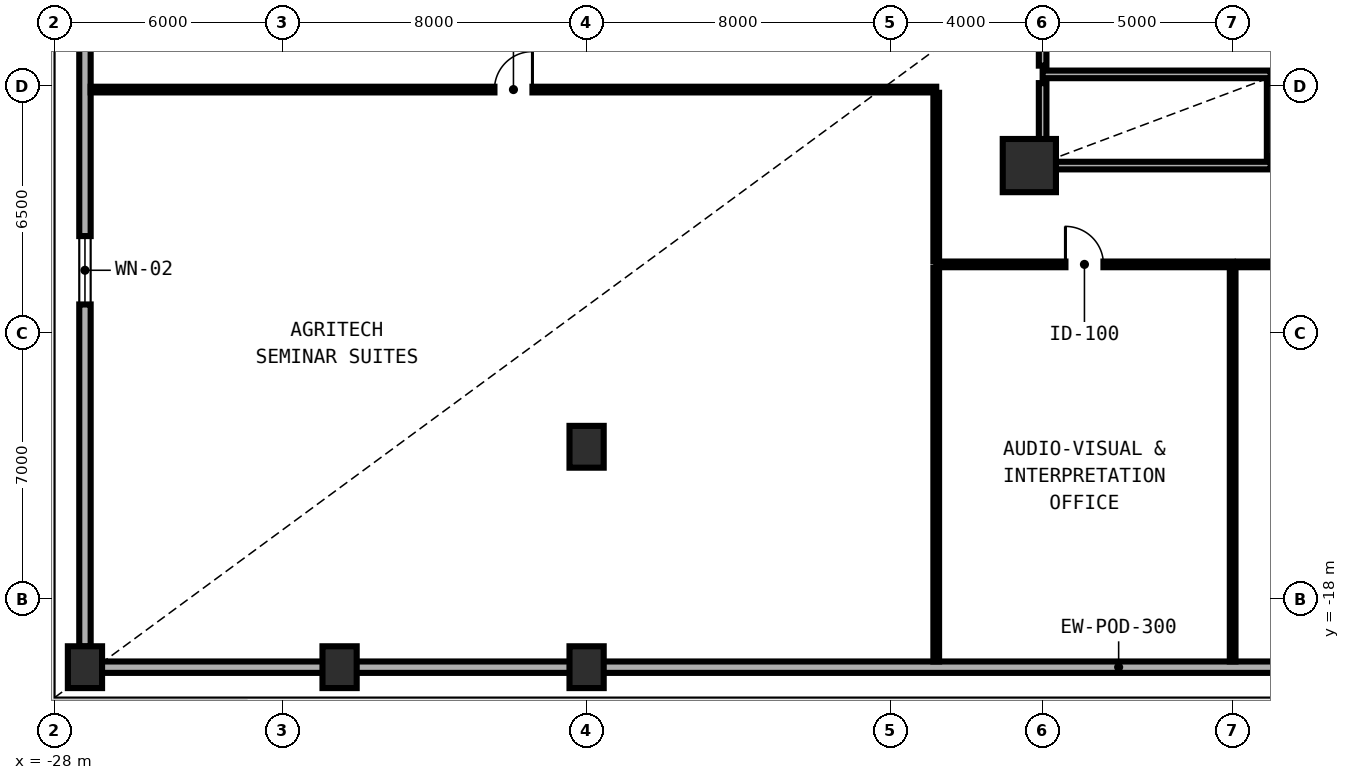
"""IFC4 building model, lengths in metres.
Left out: names, types, materials, properties, quantities, classifications, styles, units other than length and angle.
Written with IfcOpenShell. Run it as: python <this file> out.ifc"""

import sys

from ifc_helpers import new_model, si_unit, direction, frame, frame_2d, origin, origin_2d, place, context, subcontext, project, spatial, rectangle, extrude, element, fill, save


model = new_model("IFC4")
c1 = context("Model", 3, precision=1e-05, world=origin(), true_north=direction((0.0, 1.0)))
c2 = subcontext(c1, "Body", "Model", "MODEL_VIEW")
j1 = project(units=[si_unit("LENGTHUNIT", "METRE"), si_unit("PLANEANGLEUNIT", "RADIAN")], contexts=[c1])
p1 = place(None, origin())
s1 = spatial("IfcSite", under=j1, at=p1, CompositionType="ELEMENT")
p2 = place(p1, origin())
s2 = spatial("IfcBuilding", under=s1, at=p2, CompositionType="ELEMENT")
p3 = place(p2, frame((0.0, 0.0, 18.4)))
s3 = spatial("IfcBuildingStorey", under=s2, at=p3, CompositionType="ELEMENT", Elevation=18.4)
p4 = place(p3, frame((-2.35, -6.6, 0.0), z_axis=(0.0, 0.0, 1.0), x_axis=(1.0, 0.0, 0.0)))
e1 = element("IfcColumn", 1, at=p4, inside=s3, PredefinedType="COLUMN", context=c2, shape_type="SweptSolid", body=[
    extrude(rectangle(XDim=1.4, YDim=1.4, at=origin_2d()), origin(), (0.0, 0.0, 1.0), 4.575),
])
for number, where, z_axis, x_axis in (
    (2, (-27.2, -19.8, 0.0), (0.0, 0.0, 1.0), (1.0, 0.0, 0.0)),
    (3, (-20.5, -19.8, 0.0), (0.0, 0.0, 1.0), (1.0, 0.0, 0.0)),
    (4, (-14.0, -19.8, 0.0), (0.0, 0.0, 1.0), (1.0, 0.0, 0.0)),
    (5, (-14.0, -14.0, 0.0), (0.0, 0.0, 1.0), (1.0, 0.0, 0.0)),
):
    element("IfcColumn", number, at=place(p3, frame(where, z_axis=z_axis, x_axis=x_axis)), inside=s3, PredefinedType="COLUMN", context=c2, shape_type="SweptSolid", body=[
        extrude(rectangle(XDim=0.9, YDim=1.1, at=origin_2d()), origin(), (0.0, 0.0, 1.0), 4.575),
    ])
p5 = place(p3, frame((-27.2, -19.255, 0.0), z_axis=(0.0, 0.0, 1.0), x_axis=(0.0, 1.0, 0.0)))
e6 = element("IfcWall", 6, at=p5, inside=s3, PredefinedType="SOLIDWALL", context=c2, shape_type="SweptSolid", body=[
    extrude(rectangle(XDim=38.51, YDim=0.3, at=frame_2d((19.255, 0.0))), origin(), (0.0, 0.0, 1.0), 3.35),
])
p6 = place(p5, frame((9.0, 0.0, 0.85)))
e7 = element("IfcOpeningElement", 7, at=p6, cuts=e6, PredefinedType="OPENING", context=c2, shape_type="SweptSolid", body=[
    extrude(rectangle(XDim=1.8, YDim=1.9, at=frame_2d((0.9, 0.95))), frame((0.0, 0.16, 0.0), z_axis=(0.0, -1.0, 0.0), x_axis=(1.0, 0.0, 0.0)), (0.0, 0.0, 1.0), 0.32),
])
p7 = place(p5, frame((16.0, 0.0, 0.85)))
e8 = element("IfcOpeningElement", 8, at=p7, cuts=e6, PredefinedType="OPENING", context=c2, shape_type="SweptSolid", body=[
    extrude(rectangle(XDim=1.8, YDim=1.9, at=frame_2d((0.9, 0.95))), frame((0.0, 0.16, 0.0), z_axis=(0.0, -1.0, 0.0), x_axis=(1.0, 0.0, 0.0)), (0.0, 0.0, 1.0), 0.32),
])
p8 = place(p5, frame((29.0, 0.0, 0.85)))
e9 = element("IfcOpeningElement", 9, at=p8, cuts=e6, PredefinedType="OPENING", context=c2, shape_type="SweptSolid", body=[
    extrude(rectangle(XDim=1.8, YDim=1.9, at=frame_2d((0.9, 0.95))), frame((0.0, 0.16, 0.0), z_axis=(0.0, -1.0, 0.0), x_axis=(1.0, 0.0, 0.0)), (0.0, 0.0, 1.0), 0.32),
])
p9 = place(p3, frame((26.755, -19.8, 0.0), z_axis=(0.0, 0.0, 1.0), x_axis=(-1.0, 0.0, 0.0)))
e10 = element("IfcWall", 10, at=p9, inside=s3, PredefinedType="SOLIDWALL", context=c2, shape_type="SweptSolid", body=[
    extrude(rectangle(XDim=53.51, YDim=0.3, at=frame_2d((26.755, 0.0))), origin(), (0.0, 0.0, 1.0), 3.35),
])
p10 = place(p3, frame((-2.0, -4.2, 0.0), z_axis=(0.0, 0.0, 1.0), x_axis=(1.0, 0.0, 0.0)))
e11 = element("IfcWall", 11, at=p10, inside=s3, PredefinedType="SOLIDWALL", context=c2, shape_type="SweptSolid", body=[
    extrude(rectangle(XDim=6.0, YDim=0.2, at=frame_2d((3.0, 0.0))), origin(), (0.0, 0.0, 1.0), 4.28),
])
p11 = place(p3, frame((-2.0, -6.6, 0.0), z_axis=(0.0, 0.0, 1.0), x_axis=(1.0, 0.0, 0.0)))
e12 = element("IfcWall", 12, at=p11, inside=s3, PredefinedType="SOLIDWALL", context=c2, shape_type="SweptSolid", body=[
    extrude(rectangle(XDim=6.0, YDim=0.2, at=frame_2d((3.0, 0.0))), origin(), (0.0, 0.0, 1.0), 3.362),
])
p12 = place(p3, frame((-2.0, -6.37, 0.0), z_axis=(0.0, 0.0, 1.0), x_axis=(0.0, 1.0, 0.0)))
e13 = element("IfcWall", 13, at=p12, inside=s3, PredefinedType="SOLIDWALL", context=c2, shape_type="SweptSolid", body=[
    extrude(rectangle(XDim=1.94, YDim=0.2, at=frame_2d((0.97, 0.0))), origin(), (0.0, 0.0, 1.0), 3.362),
])
p13 = place(p3, frame((4.0, -6.37, 0.0), z_axis=(0.0, 0.0, 1.0), x_axis=(0.0, 1.0, 0.0)))
e14 = element("IfcWall", 14, at=p13, inside=s3, PredefinedType="SOLIDWALL", context=c2, shape_type="SweptSolid", body=[
    extrude(rectangle(XDim=1.94, YDim=0.2, at=frame_2d((0.97, 0.0))), origin(), (0.0, 0.0, 1.0), 4.28),
])
p14 = place(p3, frame((-2.0, -3.97, 0.0), z_axis=(0.0, 0.0, 1.0), x_axis=(0.0, 1.0, 0.0)))
e15 = element("IfcWall", 15, at=p14, inside=s3, PredefinedType="MOVABLE", context=c2, shape_type="SweptSolid", body=[
    extrude(rectangle(XDim=1.94, YDim=0.2, at=frame_2d((0.97, 0.0))), origin(), (0.0, 0.0, 1.0), 3.362),
])
p15 = place(p14, frame((0.47, 0.0, 0.0)))
e16 = element("IfcOpeningElement", 16, at=p15, cuts=e15, PredefinedType="OPENING", context=c2, shape_type="SweptSolid", body=[
    extrude(rectangle(XDim=1.0, YDim=2.1, at=frame_2d((0.5, 1.05))), frame((0.0, 0.11, 0.0), z_axis=(0.0, -1.0, 0.0), x_axis=(1.0, 0.0, 0.0)), (0.0, 0.0, 1.0), 0.22),
])
p16 = place(p3, frame((-27.05, -4.6, 0.0), z_axis=(0.0, 0.0, 1.0), x_axis=(1.0, 0.0, 0.0)))
e17 = element("IfcWall", 17, at=p16, inside=s3, PredefinedType="PARTITIONING", context=c2, shape_type="SweptSolid", body=[
    extrude(rectangle(XDim=22.25, YDim=0.15, at=frame_2d((11.125, 0.0))), origin(), (0.0, 0.0, 1.0), 4.28),
])
p17 = place(p16, frame((10.625, 0.0, 0.0)))
e18 = element("IfcOpeningElement", 18, at=p17, cuts=e17, PredefinedType="OPENING", context=c2, shape_type="SweptSolid", body=[
    extrude(rectangle(XDim=1.0, YDim=2.1, at=frame_2d((0.5, 1.05))), frame((0.0, 0.085, 0.0), z_axis=(0.0, -1.0, 0.0), x_axis=(1.0, 0.0, 0.0)), (0.0, 0.0, 1.0), 0.17),
])
p18 = place(p3, frame((-4.8, -9.2, 0.0), z_axis=(0.0, 0.0, 1.0), x_axis=(1.0, 0.0, 0.0)))
e19 = element("IfcWall", 19, at=p18, inside=s3, PredefinedType="PARTITIONING", context=c2, shape_type="SweptSolid", body=[
    extrude(rectangle(XDim=7.8, YDim=0.15, at=frame_2d((3.9, 0.0))), origin(), (0.0, 0.0, 1.0), 4.28),
])
p19 = place(p18, frame((3.4, 0.0, 0.0)))
e20 = element("IfcOpeningElement", 20, at=p19, cuts=e19, PredefinedType="OPENING", context=c2, shape_type="SweptSolid", body=[
    extrude(rectangle(XDim=1.0, YDim=2.1, at=frame_2d((0.5, 1.05))), frame((0.0, 0.085, 0.0), z_axis=(0.0, -1.0, 0.0), x_axis=(1.0, 0.0, 0.0)), (0.0, 0.0, 1.0), 0.17),
])
p20 = place(p3, frame((3.135, -9.2, 0.0), z_axis=(0.0, 0.0, 1.0), x_axis=(1.0, 0.0, 0.0)))
e21 = element("IfcWall", 21, at=p20, inside=s3, PredefinedType="PARTITIONING", context=c2, shape_type="SweptSolid", body=[
    extrude(rectangle(XDim=7.665, YDim=0.15, at=frame_2d((3.833, 0.0))), origin(), (0.0, 0.0, 1.0), 4.28),
])
p21 = place(p20, frame((3.265, 0.0, 0.0)))
e22 = element("IfcOpeningElement", 22, at=p21, cuts=e21, PredefinedType="OPENING", context=c2, shape_type="SweptSolid", body=[
    extrude(rectangle(XDim=1.0, YDim=2.1, at=frame_2d((0.5, 1.05))), frame((0.0, 0.085, 0.0), z_axis=(0.0, -1.0, 0.0), x_axis=(1.0, 0.0, 0.0)), (0.0, 0.0, 1.0), 0.17),
])
p22 = place(p3, frame((-4.8, -4.685, 0.0), z_axis=(0.0, 0.0, 1.0), x_axis=(0.0, -1.0, 0.0)))
e23 = element("IfcWall", 23, at=p22, inside=s3, PredefinedType="PARTITIONING", context=c2, shape_type="SweptSolid", body=[
    extrude(rectangle(XDim=4.43, YDim=0.15, at=frame_2d((2.215, 0.0))), origin(), (0.0, 0.0, 1.0), 4.28),
])
for number, where, z_axis, x_axis in (
    (24, (-4.8, -9.285, 0.0), (0.0, 0.0, 1.0), (0.0, -1.0, 0.0)),
    (25, (3.0, -9.285, 0.0), (0.0, 0.0, 1.0), (0.0, -1.0, 0.0)),
):
    element("IfcWall", number, at=place(p3, frame(where, z_axis=z_axis, x_axis=x_axis)), inside=s3, PredefinedType="PARTITIONING", context=c2, shape_type="SweptSolid", body=[
        extrude(rectangle(XDim=10.365, YDim=0.15, at=frame_2d((5.183, 0.0))), origin(), (0.0, 0.0, 1.0), 4.28),
    ])
p23 = place(p6, origin())
e26 = element("IfcWindow", 26, at=p23, inside=s3, PartitioningType="SINGLE_PANEL", PredefinedType="WINDOW", context=c2, shape_type="SweptSolid", body=[
    extrude(rectangle(XDim=1.8, YDim=1.9, at=frame_2d((0.9, 0.95))), frame((0.0, 0.03, 0.0), z_axis=(0.0, -1.0, 0.0), x_axis=(1.0, 0.0, 0.0)), (0.0, 0.0, 1.0), 0.06),
])
fill(e7, e26)
p24 = place(p17, origin())
e27 = element("IfcDoor", 27, at=p24, inside=s3, OperationType="SINGLE_SWING_RIGHT", PredefinedType="DOOR", context=c2, shape_type="SweptSolid", body=[
    extrude(rectangle(XDim=1.0, YDim=2.1, at=frame_2d((0.5, 1.05))), frame((0.0, 0.025, 0.0), z_axis=(0.0, -1.0, 0.0), x_axis=(1.0, 0.0, 0.0)), (0.0, 0.0, 1.0), 0.05),
])
fill(e18, e27)
p25 = place(p19, origin())
e28 = element("IfcDoor", 28, at=p25, inside=s3, OperationType="SINGLE_SWING_LEFT", PredefinedType="DOOR", context=c2, shape_type="SweptSolid", body=[
    extrude(rectangle(XDim=1.0, YDim=2.1, at=frame_2d((0.5, 1.05))), frame((0.0, 0.025, 0.0), z_axis=(0.0, -1.0, 0.0), x_axis=(1.0, 0.0, 0.0)), (0.0, 0.0, 1.0), 0.05),
])
fill(e20, e28)
save(model, sys.argv[1])
